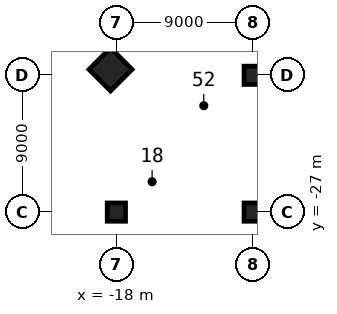
"""IFC4 building model, lengths in metres.
Left out: names, types, materials, properties, quantities, classifications, styles, units other than length and angle.
Written with IfcOpenShell. Run it as: python <this file> out.ifc"""

import sys

from ifc_helpers import new_model, si_unit, direction, frame, origin, origin_2d, place, context, subcontext, project, spatial, rectangle, extrude, element, save


model = new_model("IFC4")
c1 = context("Model", 3, precision=1e-05, world=origin(), true_north=direction((0.0, 1.0)))
c2 = subcontext(c1, "Body", "Model", "MODEL_VIEW")
j1 = project(units=[si_unit("LENGTHUNIT", "METRE"), si_unit("PLANEANGLEUNIT", "RADIAN")], contexts=[c1])
p1 = place(None, origin())
s1 = spatial("IfcSite", under=j1, at=p1, CompositionType="ELEMENT")
p2 = place(p1, origin())
s2 = spatial("IfcBuilding", under=s1, at=p2, CompositionType="ELEMENT")
p3 = place(p2, frame((0.0, 0.0, -4.5)))
s3 = spatial("IfcBuildingStorey", under=s2, at=p3, CompositionType="ELEMENT", Elevation=-4.5)
for number, where, z_axis, x_axis in (
    (1, (-18.0, -27.0, 0.0), (0.0, 0.0, 1.0), (1.0, 0.0, 0.0)),
    (2, (-9.0, -27.0, 0.0), (0.0, 0.0, 1.0), (1.0, 0.0, 0.0)),
    (3, (-9.0, -18.0, 0.0), (0.0, 0.0, 1.0), (1.0, 0.0, 0.0)),
):
    element("IfcColumn", number, at=place(p3, frame(where, z_axis=z_axis, x_axis=x_axis)), inside=s3, PredefinedType="COLUMN", context=c2, shape_type="SweptSolid", body=[
        extrude(rectangle(XDim=1.2, YDim=1.2, at=origin_2d()), origin(), (0.0, 0.0, 1.0), 4.5),
    ])
p4 = place(p3, frame((-18.386, -17.614, 0.0), z_axis=(0.0, 0.0, 1.0), x_axis=(0.707106781187, -0.707106781187, 0.0)))
e4 = element("IfcColumn", 4, at=p4, inside=s3, PredefinedType="COLUMN", context=c2, shape_type="SweptSolid", body=[
    extrude(rectangle(XDim=2.0, YDim=2.0, at=origin_2d()), origin(), (0.0, 0.0, 1.0), 4.5),
])
save(model, sys.argv[1])
